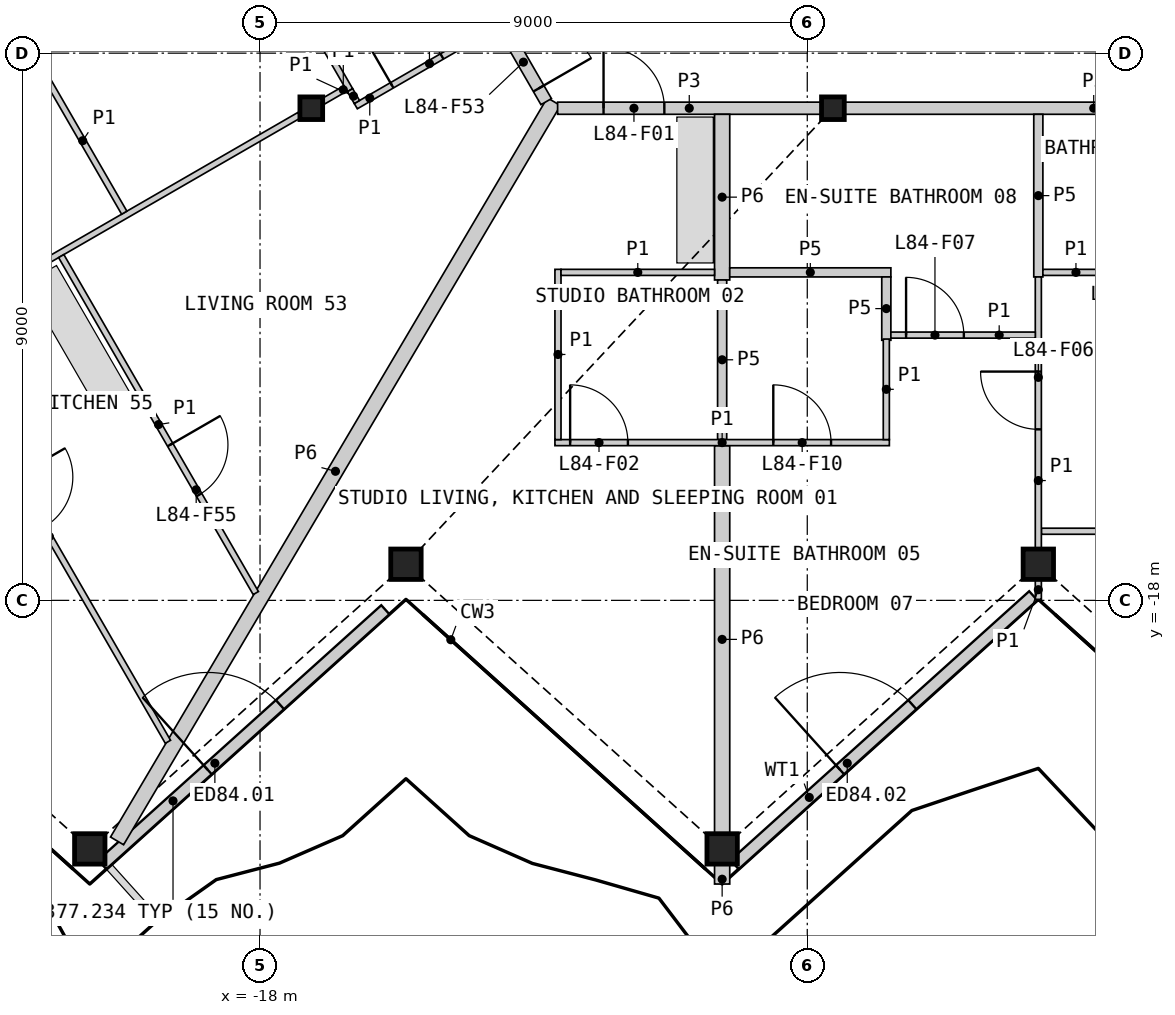
"""IFC4 building model, lengths in metres.
Left out: names, types, materials, properties, quantities, classifications, styles, units other than length and angle.
Written with IfcOpenShell. Run it as: python <this file> out.ifc"""

import sys

from ifc_helpers import new_model, si_unit, direction, frame, frame_2d, origin, origin_2d, place, context, subcontext, project, spatial, rectangle, hollow_rectangle, i_section, extrude, element, fill, save


model = new_model("IFC4")
c1 = context("Model", 3, precision=1e-05, world=origin(), true_north=direction((0.0, 1.0)))
c2 = subcontext(c1, "Body", "Model", "MODEL_VIEW")
j1 = project(units=[si_unit("LENGTHUNIT", "METRE"), si_unit("PLANEANGLEUNIT", "RADIAN")], contexts=[c1])
p1 = place(None, origin())
s1 = spatial("IfcSite", under=j1, at=p1, CompositionType="ELEMENT")
p2 = place(p1, origin())
s2 = spatial("IfcBuilding", under=s1, at=p2, CompositionType="ELEMENT")
p3 = place(p2, frame((0.0, 0.0, 374.6)))
s3 = spatial("IfcBuildingStorey", under=s2, at=p3, CompositionType="ELEMENT", Elevation=374.6)
for number, where, z_axis, x_axis in (
    (1, (-20.8, -22.088, 0.0), (0.0, 0.0, 1.0), (1.0, 0.0, 0.0)),
    (2, (-15.6, -17.406, 0.0), (0.0, 0.0, 1.0), (1.0, 0.0, 0.0)),
    (3, (-10.4, -22.088, 0.0), (0.0, 0.0, 1.0), (1.0, 0.0, 0.0)),
    (4, (-5.2, -17.406, 0.0), (0.0, 0.0, 1.0), (1.0, 0.0, 0.0)),
):
    element("IfcColumn", number, at=place(p3, frame(where, z_axis=z_axis, x_axis=x_axis)), inside=s3, PredefinedType="COLUMN", context=c2, shape_type="SweptSolid", body=[
        extrude(hollow_rectangle(XDim=0.5, YDim=0.5, WallThickness=0.03, at=origin_2d()), origin(), (0.0, 0.0, 1.0), 3.4),
    ])
for number, where, z_axis, x_axis in (
    (5, (-17.157, -9.906, 0.0), (0.0, 0.0, 1.0), (1.0, 0.0, 0.0)),
    (6, (-8.578, -9.906, 0.0), (0.0, 0.0, 1.0), (1.0, 0.0, 0.0)),
):
    element("IfcColumn", number, at=place(p3, frame(where, z_axis=z_axis, x_axis=x_axis)), inside=s3, PredefinedType="COLUMN", context=c2, shape_type="SweptSolid", body=[
        extrude(i_section(OverallWidth=0.374, OverallDepth=0.372, WebThickness=0.016, FlangeThickness=0.026, at=origin_2d()), origin(), (0.0, 0.0, 1.0), 3.4),
    ])
p4 = place(p3, frame((-20.595, -22.346, 0.0), z_axis=(0.0, 0.0, 1.0), x_axis=(0.743137181878, 0.669139095339, 0.0)))
e7 = element("IfcWall", 7, at=p4, inside=s3, PredefinedType="SOLIDWALL", context=c2, shape_type="SweptSolid", body=[
    extrude(rectangle(XDim=6.265, YDim=0.2, at=frame_2d((3.133, 0.0))), origin(), (0.0, 0.0, 1.0), 2.634),
])
p5 = place(p4, frame((2.333, 0.0, 0.0)))
e8 = element("IfcOpeningElement", 8, at=p5, cuts=e7, PredefinedType="OPENING", context=c2, shape_type="SweptSolid", body=[
    extrude(rectangle(XDim=1.6, YDim=2.25, at=frame_2d((0.8, 1.125))), frame((0.0, 0.11, 0.0), z_axis=(0.0, -1.0, 0.0), x_axis=(1.0, 0.0, 0.0)), (0.0, 0.0, 1.0), 0.22),
])
p6 = place(p3, frame((-10.195, -22.346, 0.0), z_axis=(0.0, 0.0, 1.0), x_axis=(0.74313432117, 0.66914227239, 0.0)))
e9 = element("IfcWall", 9, at=p6, inside=s3, PredefinedType="SOLIDWALL", context=c2, shape_type="SweptSolid", body=[
    extrude(rectangle(XDim=6.609, YDim=0.2, at=frame_2d((3.304, 0.0))), origin(), (0.0, 0.0, 1.0), 2.634),
])
p7 = place(p6, frame((2.333, 0.0, 0.0)))
e10 = element("IfcOpeningElement", 10, at=p7, cuts=e9, PredefinedType="OPENING", context=c2, shape_type="SweptSolid", body=[
    extrude(rectangle(XDim=1.6, YDim=2.25, at=frame_2d((0.8, 1.125))), frame((0.0, 0.11, 0.0), z_axis=(0.0, -1.0, 0.0), x_axis=(1.0, 0.0, 0.0)), (0.0, 0.0, 1.0), 0.22),
])
p8 = place(p3, frame((-20.351, -21.956, 0.0), z_axis=(0.0, 0.0, 1.0), x_axis=(0.508713003719, 0.860936164793, 0.0)))
e11 = element("IfcWall", 11, at=p8, inside=s3, PredefinedType="PARTITIONING", context=c2, shape_type="SweptSolid", body=[
    extrude(rectangle(XDim=14.122, YDim=0.25, at=frame_2d((7.061, 0.0))), origin(), (0.0, 0.0, 1.0), 2.33),
])
p9 = place(p3, frame((-8.382, -9.906, 0.0), z_axis=(0.0, 0.0, 1.0), x_axis=(1.0, 0.0, 0.0)))
e12 = element("IfcWall", 12, at=p9, inside=s3, PredefinedType="PARTITIONING", context=c2, shape_type="SweptSolid", body=[
    extrude(rectangle(XDim=8.185, YDim=0.2, at=frame_2d((4.092, 0.0))), origin(), (0.0, 0.0, 1.0), 3.1),
])
p10 = place(p9, frame((6.023, 0.0, 0.0)))
e13 = element("IfcOpeningElement", 13, at=p10, cuts=e12, PredefinedType="OPENING", context=c2, shape_type="SweptSolid", body=[
    extrude(rectangle(XDim=1.0, YDim=2.1, at=frame_2d((0.5, 1.05))), frame((0.0, 0.11, 0.0), z_axis=(0.0, -1.0, 0.0), x_axis=(1.0, 0.0, 0.0)), (0.0, 0.0, 1.0), 0.22),
])
p11 = place(p3, frame((-10.4, -21.828, 0.0), z_axis=(0.0, 0.0, 1.0), x_axis=(0.0, 1.0, 0.0)))
e14 = element("IfcWall", 14, at=p11, inside=s3, PredefinedType="PARTITIONING", context=c2, shape_type="SweptSolid", body=[
    extrude(rectangle(XDim=6.372, YDim=0.25, at=frame_2d((3.186, 0.0))), origin(), (0.0, 0.0, 1.0), 2.33),
])
p12 = place(p3, frame((-13.106, -9.906, 0.0), z_axis=(0.0, 0.0, 1.0), x_axis=(1.0, 0.0, 0.0)))
e15 = element("IfcWall", 15, at=p12, inside=s3, PredefinedType="PARTITIONING", context=c2, shape_type="SweptSolid", body=[
    extrude(rectangle(XDim=4.331, YDim=0.2, at=frame_2d((2.165, 0.0))), origin(), (0.0, 0.0, 1.0), 3.1),
])
p13 = place(p12, frame((0.755, 0.0, 0.0)))
e16 = element("IfcOpeningElement", 16, at=p13, cuts=e15, PredefinedType="OPENING", context=c2, shape_type="SweptSolid", body=[
    extrude(rectangle(XDim=1.0, YDim=2.1, at=frame_2d((0.5, 1.05))), frame((0.0, 0.11, 0.0), z_axis=(0.0, -1.0, 0.0), x_axis=(1.0, 0.0, 0.0)), (0.0, 0.0, 1.0), 0.22),
])
p14 = place(p3, frame((-15.131, -6.614, 0.0), z_axis=(0.0, 0.0, 1.0), x_axis=(0.499967746641, -0.866044024469, 0.0)))
e17 = element("IfcWall", 17, at=p14, inside=s3, PredefinedType="PARTITIONING", context=c2, shape_type="SweptSolid", body=[
    extrude(rectangle(XDim=3.676, YDim=0.2, at=frame_2d((1.838, 0.0))), origin(), (0.0, 0.0, 1.0), 3.1),
])
p15 = place(p14, frame((2.426, 0.0, 0.0)))
e18 = element("IfcOpeningElement", 18, at=p15, cuts=e17, PredefinedType="OPENING", context=c2, shape_type="SweptSolid", body=[
    extrude(rectangle(XDim=1.0, YDim=2.1, at=frame_2d((0.5, 1.05))), frame((0.0, 0.11, 0.0), z_axis=(0.0, -1.0, 0.0), x_axis=(1.0, 0.0, 0.0)), (0.0, 0.0, 1.0), 0.22),
])
p16 = place(p3, frame((-10.4, -12.731, 0.0), z_axis=(0.0, 0.0, 1.0), x_axis=(0.0, 1.0, 0.0)))
e19 = element("IfcWall", 19, at=p16, inside=s3, PredefinedType="PARTITIONING", context=c2, shape_type="SweptSolid", body=[
    extrude(rectangle(XDim=2.725, YDim=0.25, at=frame_2d((1.363, 0.0))), origin(), (0.0, 0.0, 1.0), 2.33),
])
p17 = place(p3, frame((-10.4, -22.666, 0.0), z_axis=(0.0, 0.0, 1.0), x_axis=(0.0, 1.0, 0.0)))
e20 = element("IfcWall", 20, at=p17, inside=s3, PredefinedType="PARTITIONING", context=c2, shape_type="SweptSolid", body=[
    extrude(rectangle(XDim=0.318, YDim=0.25, at=frame_2d((0.159, 0.0))), origin(), (0.0, 0.0, 1.0), 2.33),
])
p18 = place(p3, frame((-10.4, -15.356, 0.0), z_axis=(0.0, 0.0, 1.0), x_axis=(0.0, 1.0, 0.0)))
e21 = element("IfcWall", 21, at=p18, inside=s3, PredefinedType="PLUMBINGWALL", context=c2, shape_type="SweptSolid", body=[
    extrude(rectangle(XDim=2.625, YDim=0.15, at=frame_2d((1.312, 0.0))), origin(), (0.0, 0.0, 1.0), 2.33),
])
p19 = place(p3, frame((-5.2, -12.681, 0.0), z_axis=(0.0, 0.0, 1.0), x_axis=(0.0, 1.0, 0.0)))
e22 = element("IfcWall", 22, at=p19, inside=s3, PredefinedType="PLUMBINGWALL", context=c2, shape_type="SweptSolid", body=[
    extrude(rectangle(XDim=2.675, YDim=0.15, at=frame_2d((1.337, 0.0))), origin(), (0.0, 0.0, 1.0), 2.33),
])
p20 = place(p3, frame((-10.275, -12.606, 0.0), z_axis=(0.0, 0.0, 1.0), x_axis=(1.0, 0.0, 0.0)))
e23 = element("IfcWall", 23, at=p20, inside=s3, PredefinedType="PLUMBINGWALL", context=c2, shape_type="SweptSolid", body=[
    extrude(rectangle(XDim=2.65, YDim=0.15, at=frame_2d((1.325, 0.0))), origin(), (0.0, 0.0, 1.0), 2.33),
])
p21 = place(p3, frame((-7.7, -13.722, 0.0), z_axis=(0.0, 0.0, 1.0), x_axis=(0.0, 1.0, 0.0)))
e24 = element("IfcWall", 24, at=p21, inside=s3, PredefinedType="PLUMBINGWALL", context=c2, shape_type="SweptSolid", body=[
    extrude(rectangle(XDim=1.042, YDim=0.15, at=frame_2d((0.521, 0.0))), origin(), (0.0, 0.0, 1.0), 2.33),
])
p22 = place(p3, frame((-26.777, -15.46, 0.0), z_axis=(0.0, 0.0, 1.0), x_axis=(0.866019680922, 0.500009912158, 0.0)))
e25 = element("IfcWall", 25, at=p22, inside=s3, PredefinedType="PARTITIONING", context=c2, shape_type="SweptSolid", body=[
    extrude(rectangle(XDim=10.881, YDim=0.1, at=frame_2d((5.44, 0.0))), origin(), (0.0, 0.0, 1.0), 2.33),
])
p23 = place(p22, frame((1.454, 0.0, 0.0)))
e26 = element("IfcOpeningElement", 26, at=p23, cuts=e25, PredefinedType="OPENING", context=c2, shape_type="SweptSolid", body=[
    extrude(rectangle(XDim=0.95, YDim=2.1, at=frame_2d((0.475, 1.05))), frame((0.0, 0.06, 0.0), z_axis=(0.0, -1.0, 0.0), x_axis=(1.0, 0.0, 0.0)), (0.0, 0.0, 1.0), 0.12),
])
p24 = place(p3, frame((-23.413, -13.575, 0.0), z_axis=(0.0, 0.0, 1.0), x_axis=(0.499998958472, -0.86602600511, 0.0)))
e27 = element("IfcWall", 27, at=p24, inside=s3, PredefinedType="PARTITIONING", context=c2, shape_type="SweptSolid", body=[
    extrude(rectangle(XDim=7.796, YDim=0.1, at=frame_2d((3.898, 0.0))), origin(), (0.0, 0.0, 1.0), 2.33),
])
p25 = place(p24, frame((2.768, 0.0, 0.0)))
e28 = element("IfcOpeningElement", 28, at=p25, cuts=e27, PredefinedType="OPENING", context=c2, shape_type="SweptSolid", body=[
    extrude(rectangle(XDim=0.95, YDim=2.1, at=frame_2d((0.475, 1.05))), frame((0.0, 0.06, 0.0), z_axis=(0.0, -1.0, 0.0), x_axis=(1.0, 0.0, 0.0)), (0.0, 0.0, 1.0), 0.12),
])
p26 = place(p3, frame((-21.269, -12.337, 0.0), z_axis=(0.0, 0.0, 1.0), x_axis=(0.499983315828, -0.866035036182, 0.0)))
e29 = element("IfcWall", 29, at=p26, inside=s3, PredefinedType="PARTITIONING", context=c2, shape_type="SweptSolid", body=[
    extrude(rectangle(XDim=6.4, YDim=0.1, at=frame_2d((3.2, 0.0))), origin(), (0.0, 0.0, 1.0), 2.33),
])
p27 = place(p26, frame((3.584, 0.0, 0.0)))
e30 = element("IfcOpeningElement", 30, at=p27, cuts=e29, PredefinedType="OPENING", context=c2, shape_type="SweptSolid", body=[
    extrude(rectangle(XDim=0.95, YDim=2.1, at=frame_2d((0.475, 1.05))), frame((0.0, 0.06, 0.0), z_axis=(0.0, -1.0, 0.0), x_axis=(1.0, 0.0, 0.0)), (0.0, 0.0, 1.0), 0.12),
])
p28 = place(p3, frame((-13.15, -15.406, 0.0), z_axis=(0.0, 0.0, 1.0), x_axis=(1.0, 0.0, 0.0)))
e31 = element("IfcWall", 31, at=p28, inside=s3, PredefinedType="PARTITIONING", context=c2, shape_type="SweptSolid", body=[
    extrude(rectangle(XDim=5.5, YDim=0.1, at=frame_2d((2.75, 0.0))), origin(), (0.0, 0.0, 1.0), 2.33),
])
p29 = place(p28, frame((0.25, 0.0, 0.0)))
e32 = element("IfcOpeningElement", 32, at=p29, cuts=e31, PredefinedType="OPENING", context=c2, shape_type="SweptSolid", body=[
    extrude(rectangle(XDim=0.95, YDim=2.1, at=frame_2d((0.475, 1.05))), frame((0.0, 0.06, 0.0), z_axis=(0.0, -1.0, 0.0), x_axis=(1.0, 0.0, 0.0)), (0.0, 0.0, 1.0), 0.12),
])
p30 = place(p28, frame((3.591, 0.0, 0.0)))
e33 = element("IfcOpeningElement", 33, at=p30, cuts=e31, PredefinedType="OPENING", context=c2, shape_type="SweptSolid", body=[
    extrude(rectangle(XDim=0.95, YDim=2.1, at=frame_2d((0.475, 1.05))), frame((0.0, 0.06, 0.0), z_axis=(0.0, -1.0, 0.0), x_axis=(1.0, 0.0, 0.0)), (0.0, 0.0, 1.0), 0.12),
])
p31 = place(p3, frame((-5.15, -16.863, 0.0), z_axis=(0.0, 0.0, 1.0), x_axis=(1.0, 0.0, 0.0)))
e34 = element("IfcWall", 34, at=p31, inside=s3, PredefinedType="PARTITIONING", context=c2, shape_type="SweptSolid", body=[
    extrude(rectangle(XDim=5.1, YDim=0.1, at=frame_2d((2.55, 0.0))), origin(), (0.0, 0.0, 1.0), 2.33),
])
p32 = place(p31, frame((2.075, 0.0, 0.0)))
e35 = element("IfcOpeningElement", 35, at=p32, cuts=e34, PredefinedType="OPENING", context=c2, shape_type="SweptSolid", body=[
    extrude(rectangle(XDim=0.95, YDim=2.1, at=frame_2d((0.475, 1.05))), frame((0.0, 0.06, 0.0), z_axis=(0.0, -1.0, 0.0), x_axis=(1.0, 0.0, 0.0)), (0.0, 0.0, 1.0), 0.12),
])
p33 = place(p3, frame((-5.2, -17.146, 0.0), z_axis=(0.0, 0.0, 1.0), x_axis=(0.0, 1.0, 0.0)))
e36 = element("IfcWall", 36, at=p33, inside=s3, PredefinedType="PARTITIONING", context=c2, shape_type="SweptSolid", body=[
    extrude(rectangle(XDim=4.465, YDim=0.1, at=frame_2d((2.232, 0.0))), origin(), (0.0, 0.0, 1.0), 2.33),
])
p34 = place(p33, frame((1.958, 0.0, 0.0)))
e37 = element("IfcOpeningElement", 37, at=p34, cuts=e36, PredefinedType="OPENING", context=c2, shape_type="SweptSolid", body=[
    extrude(rectangle(XDim=0.95, YDim=2.1, at=frame_2d((0.475, 1.05))), frame((0.0, 0.06, 0.0), z_axis=(0.0, -1.0, 0.0), x_axis=(1.0, 0.0, 0.0)), (0.0, 0.0, 1.0), 0.12),
])
p35 = place(p3, frame((-21.6, -9.256, 0.0), z_axis=(0.0, 0.0, 1.0), x_axis=(0.500018733116, -0.866014587945, 0.0)))
e38 = element("IfcWall", 38, at=p35, inside=s3, PredefinedType="PARTITIONING", context=c2, shape_type="SweptSolid", body=[
    extrude(rectangle(XDim=2.734, YDim=0.1, at=frame_2d((1.367, 0.0))), origin(), (0.0, 0.0, 1.0), 2.33),
])
p36 = place(p3, frame((-13.1, -15.356, 0.0), z_axis=(0.0, 0.0, 1.0), x_axis=(0.0, 1.0, 0.0)))
e39 = element("IfcWall", 39, at=p36, inside=s3, PredefinedType="PARTITIONING", context=c2, shape_type="SweptSolid", body=[
    extrude(rectangle(XDim=2.8, YDim=0.1, at=frame_2d((1.4, 0.0))), origin(), (0.0, 0.0, 1.0), 2.33),
])
p37 = place(p3, frame((-13.05, -12.606, 0.0), z_axis=(0.0, 0.0, 1.0), x_axis=(1.0, 0.0, 0.0)))
e40 = element("IfcWall", 40, at=p37, inside=s3, PredefinedType="PARTITIONING", context=c2, shape_type="SweptSolid", body=[
    extrude(rectangle(XDim=2.525, YDim=0.1, at=frame_2d((1.263, 0.0))), origin(), (0.0, 0.0, 1.0), 2.33),
])
p38 = place(p3, frame((-16.425, -9.872, 0.0), z_axis=(0.0, 0.0, 1.0), x_axis=(0.86603978909, 0.499975083092, 0.0)))
e41 = element("IfcWall", 41, at=p38, inside=s3, PredefinedType="PARTITIONING", context=c2, shape_type="SweptSolid", body=[
    extrude(rectangle(XDim=2.649, YDim=0.1, at=frame_2d((1.325, 0.0))), origin(), (0.0, 0.0, 1.0), 2.33),
])
p39 = place(p38, frame((0.686, 0.0, 0.0)))
e42 = element("IfcOpeningElement", 42, at=p39, cuts=e41, PredefinedType="OPENING", context=c2, shape_type="SweptSolid", body=[
    extrude(rectangle(XDim=0.95, YDim=2.1, at=frame_2d((0.475, 1.05))), frame((0.0, 0.06, 0.0), z_axis=(0.0, -1.0, 0.0), x_axis=(1.0, 0.0, 0.0)), (0.0, 0.0, 1.0), 0.12),
])
p40 = place(p3, frame((-7.625, -13.637, 0.0), z_axis=(0.0, 0.0, 1.0), x_axis=(1.0, 0.0, 0.0)))
e43 = element("IfcWall", 43, at=p40, inside=s3, PredefinedType="PARTITIONING", context=c2, shape_type="SweptSolid", body=[
    extrude(rectangle(XDim=2.375, YDim=0.1, at=frame_2d((1.188, 0.0))), origin(), (0.0, 0.0, 1.0), 2.33),
])
p41 = place(p40, frame((0.25, 0.0, 0.0)))
e44 = element("IfcOpeningElement", 44, at=p41, cuts=e43, PredefinedType="OPENING", context=c2, shape_type="SweptSolid", body=[
    extrude(rectangle(XDim=0.95, YDim=2.1, at=frame_2d((0.475, 1.05))), frame((0.0, 0.06, 0.0), z_axis=(0.0, -1.0, 0.0), x_axis=(1.0, 0.0, 0.0)), (0.0, 0.0, 1.0), 0.12),
])
p42 = place(p3, frame((-5.125, -12.606, 0.0), z_axis=(0.0, 0.0, 1.0), x_axis=(1.0, 0.0, 0.0)))
e45 = element("IfcWall", 45, at=p42, inside=s3, PredefinedType="PARTITIONING", context=c2, shape_type="SweptSolid", body=[
    extrude(rectangle(XDim=2.175, YDim=0.1, at=frame_2d((1.087, 0.0))), origin(), (0.0, 0.0, 1.0), 2.33),
])
p43 = place(p42, frame((0.975, 0.0, 0.0)))
e46 = element("IfcOpeningElement", 46, at=p43, cuts=e45, PredefinedType="OPENING", context=c2, shape_type="SweptSolid", body=[
    extrude(rectangle(XDim=0.95, YDim=2.1, at=frame_2d((0.475, 1.05))), frame((0.0, 0.06, 0.0), z_axis=(0.0, -1.0, 0.0), x_axis=(1.0, 0.0, 0.0)), (0.0, 0.0, 1.0), 0.12),
])
p44 = place(p3, frame((-17.507, -7.899, 0.0), z_axis=(0.0, 0.0, 1.0), x_axis=(0.500011643316, -0.866018681408, 0.0)))
e47 = element("IfcWall", 47, at=p44, inside=s3, PredefinedType="PARTITIONING", context=c2, shape_type="SweptSolid", body=[
    extrude(rectangle(XDim=1.973, YDim=0.1, at=frame_2d((0.987, 0.0))), origin(), (0.0, 0.0, 1.0), 2.33),
])
p45 = place(p3, frame((-7.7, -15.356, 0.0), z_axis=(0.0, 0.0, 1.0), x_axis=(0.0, 1.0, 0.0)))
e48 = element("IfcWall", 48, at=p45, inside=s3, PredefinedType="PARTITIONING", context=c2, shape_type="SweptSolid", body=[
    extrude(rectangle(XDim=1.654, YDim=0.1, at=frame_2d((0.827, 0.0))), origin(), (0.0, 0.0, 1.0), 2.33),
])
p46 = place(p3, frame((-16.96, -9.792, 0.0), z_axis=(0.0, 0.0, 1.0), x_axis=(0.866137484628, 0.499805820016, 0.0)))
e49 = element("IfcWall", 49, at=p46, inside=s3, PredefinedType="PARTITIONING", context=c2, shape_type="SweptSolid", body=[
    extrude(rectangle(XDim=0.423, YDim=0.1, at=frame_2d((0.211, 0.0))), origin(), (0.0, 0.0, 1.0), 2.33),
])
p47 = place(p3, frame((-5.2, -17.983, 0.0), z_axis=(0.0, 0.0, 1.0), x_axis=(0.0, 1.0, 0.0)))
e50 = element("IfcWall", 50, at=p47, inside=s3, PredefinedType="PARTITIONING", context=c2, shape_type="SweptSolid", body=[
    extrude(rectangle(XDim=0.318, YDim=0.1, at=frame_2d((0.159, 0.0))), origin(), (0.0, 0.0, 1.0), 2.33),
])
p48 = place(p3, frame((-16.519, -9.61, 0.0), z_axis=(0.0, 0.0, 1.0), x_axis=(0.50245032488, -0.864606078528, 0.0)))
e51 = element("IfcWall", 51, at=p48, inside=s3, PredefinedType="PARTITIONING", context=c2, shape_type="SweptSolid", body=[
    extrude(rectangle(XDim=0.224, YDim=0.1, at=frame_2d((0.112, 0.0))), origin(), (0.0, 0.0, 1.0), 2.33),
])
p49 = place(p5, origin())
e52 = element("IfcDoor", 52, at=p49, inside=s3, OperationType="DOUBLE_DOOR_SINGLE_SWING", PredefinedType="DOOR", context=c2, shape_type="SweptSolid", body=[
    extrude(rectangle(XDim=1.6, YDim=2.25, at=frame_2d((0.8, 1.125))), frame((0.0, 0.025, 0.0), z_axis=(0.0, -1.0, 0.0), x_axis=(1.0, 0.0, 0.0)), (0.0, 0.0, 1.0), 0.05),
])
fill(e8, e52)
p50 = place(p7, origin())
e53 = element("IfcDoor", 53, at=p50, inside=s3, OperationType="DOUBLE_DOOR_SINGLE_SWING", PredefinedType="DOOR", context=c2, shape_type="SweptSolid", body=[
    extrude(rectangle(XDim=1.6, YDim=2.25, at=frame_2d((0.8, 1.125))), frame((0.0, 0.025, 0.0), z_axis=(0.0, -1.0, 0.0), x_axis=(1.0, 0.0, 0.0)), (0.0, 0.0, 1.0), 0.05),
])
fill(e10, e53)
p51 = place(p13, origin())
e54 = element("IfcDoor", 54, at=p51, inside=s3, OperationType="SINGLE_SWING_LEFT", PredefinedType="DOOR", context=c2, shape_type="SweptSolid", body=[
    extrude(rectangle(XDim=1.0, YDim=2.1, at=frame_2d((0.5, 1.05))), frame((0.0, 0.025, 0.0), z_axis=(0.0, -1.0, 0.0), x_axis=(1.0, 0.0, 0.0)), (0.0, 0.0, 1.0), 0.05),
])
fill(e16, e54)
p52 = place(p29, origin())
e55 = element("IfcDoor", 55, at=p52, inside=s3, OperationType="SINGLE_SWING_LEFT", PredefinedType="DOOR", context=c2, shape_type="SweptSolid", body=[
    extrude(rectangle(XDim=0.95, YDim=2.1, at=frame_2d((0.475, 1.05))), frame((0.0, 0.025, 0.0), z_axis=(0.0, -1.0, 0.0), x_axis=(1.0, 0.0, 0.0)), (0.0, 0.0, 1.0), 0.05),
])
fill(e32, e55)
p53 = place(p34, origin())
e56 = element("IfcDoor", 56, at=p53, inside=s3, OperationType="SINGLE_SWING_RIGHT", PredefinedType="DOOR", context=c2, shape_type="SweptSolid", body=[
    extrude(rectangle(XDim=0.95, YDim=2.1, at=frame_2d((0.475, 1.05))), frame((0.0, 0.025, 0.0), z_axis=(0.0, -1.0, 0.0), x_axis=(1.0, 0.0, 0.0)), (0.0, 0.0, 1.0), 0.05),
])
fill(e37, e56)
p54 = place(p41, origin())
e57 = element("IfcDoor", 57, at=p54, inside=s3, OperationType="SINGLE_SWING_LEFT", PredefinedType="DOOR", context=c2, shape_type="SweptSolid", body=[
    extrude(rectangle(XDim=0.95, YDim=2.1, at=frame_2d((0.475, 1.05))), frame((0.0, 0.025, 0.0), z_axis=(0.0, -1.0, 0.0), x_axis=(1.0, 0.0, 0.0)), (0.0, 0.0, 1.0), 0.05),
])
fill(e44, e57)
p55 = place(p30, origin())
e58 = element("IfcDoor", 58, at=p55, inside=s3, OperationType="SINGLE_SWING_LEFT", PredefinedType="DOOR", context=c2, shape_type="SweptSolid", body=[
    extrude(rectangle(XDim=0.95, YDim=2.1, at=frame_2d((0.475, 1.05))), frame((0.0, 0.025, 0.0), z_axis=(0.0, -1.0, 0.0), x_axis=(1.0, 0.0, 0.0)), (0.0, 0.0, 1.0), 0.05),
])
fill(e33, e58)
p56 = place(p15, origin())
e59 = element("IfcDoor", 59, at=p56, inside=s3, OperationType="SINGLE_SWING_RIGHT", PredefinedType="DOOR", context=c2, shape_type="SweptSolid", body=[
    extrude(rectangle(XDim=1.0, YDim=2.1, at=frame_2d((0.5, 1.05))), frame((0.0, 0.025, 0.0), z_axis=(0.0, -1.0, 0.0), x_axis=(1.0, 0.0, 0.0)), (0.0, 0.0, 1.0), 0.05),
])
fill(e18, e59)
p57 = place(p39, origin())
e60 = element("IfcDoor", 60, at=p57, inside=s3, OperationType="SINGLE_SWING_LEFT", PredefinedType="DOOR", context=c2, shape_type="SweptSolid", body=[
    extrude(rectangle(XDim=0.95, YDim=2.1, at=frame_2d((0.475, 1.05))), frame((0.0, 0.025, 0.0), z_axis=(0.0, -1.0, 0.0), x_axis=(1.0, 0.0, 0.0)), (0.0, 0.0, 1.0), 0.05),
])
fill(e42, e60)
p58 = place(p27, origin())
e61 = element("IfcDoor", 61, at=p58, inside=s3, OperationType="SINGLE_SWING_LEFT", PredefinedType="DOOR", context=c2, shape_type="SweptSolid", body=[
    extrude(rectangle(XDim=0.95, YDim=2.1, at=frame_2d((0.475, 1.05))), frame((0.0, 0.025, 0.0), z_axis=(0.0, -1.0, 0.0), x_axis=(1.0, 0.0, 0.0)), (0.0, 0.0, 1.0), 0.05),
])
fill(e30, e61)
save(model, sys.argv[1])
